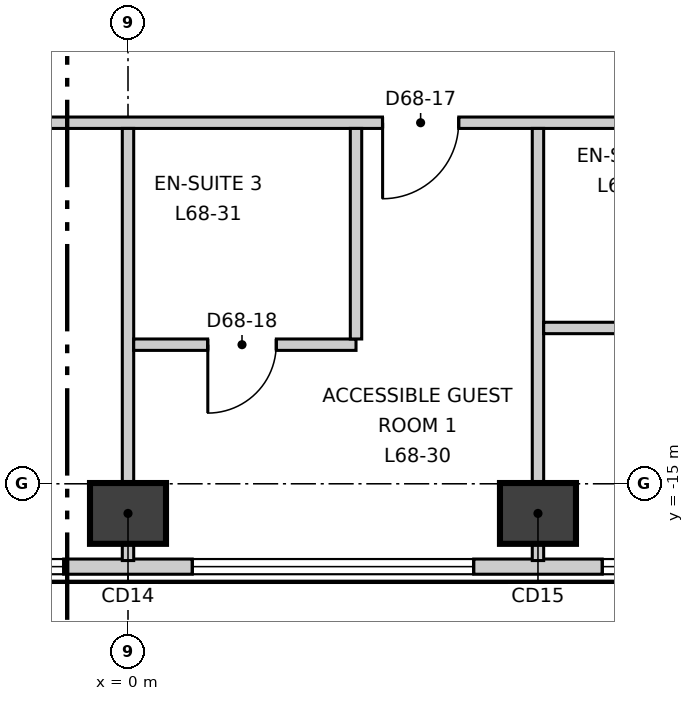
"""IFC4 building model, lengths in metres.
Left out: names, types, materials, properties, quantities, classifications, styles, units other than length and angle.
Written with IfcOpenShell. Run it as: python <this file> out.ifc"""

import sys

from ifc_helpers import new_model, si_unit, direction, frame, frame_2d, origin, origin_2d, place, context, subcontext, project, spatial, rectangle, extrude, element, fill, save


model = new_model("IFC4")
c1 = context("Model", 3, precision=1e-05, world=origin(), true_north=direction((0.0, 1.0)))
c2 = subcontext(c1, "Body", "Model", "MODEL_VIEW")
j1 = project(units=[si_unit("LENGTHUNIT", "METRE"), si_unit("PLANEANGLEUNIT", "RADIAN")], contexts=[c1])
p1 = place(None, origin())
s1 = spatial("IfcSite", under=j1, at=p1, CompositionType="ELEMENT")
p2 = place(p1, origin())
s2 = spatial("IfcBuilding", under=s1, at=p2, CompositionType="ELEMENT")
p3 = place(p2, frame((0.0, 0.0, 289.9)))
s3 = spatial("IfcBuildingStorey", under=s2, at=p3, CompositionType="ELEMENT", Elevation=289.9)
for number, where, z_axis, x_axis in (
    (1, (0.0, -15.39, -0.3), (0.0, 0.0, 1.0), (1.0, 0.0, 0.0)),
    (2, (5.394, -15.39, -0.3), (0.0, 0.0, 1.0), (1.0, 0.0, 0.0)),
):
    element("IfcColumn", number, at=place(p3, frame(where, z_axis=z_axis, x_axis=x_axis)), inside=s3, PredefinedType="COLUMN", context=c2, shape_type="SweptSolid", body=[
        extrude(rectangle(XDim=1.0, YDim=0.8, at=origin_2d()), origin(), (0.0, 0.0, 1.0), 3.6),
    ])
p4 = place(p3, frame((-22.88, -16.09, 0.0), z_axis=(0.0, 0.0, 1.0), x_axis=(1.0, 0.0, 0.0)))
e3 = element("IfcWall", 3, at=p4, inside=s3, PredefinedType="ELEMENTEDWALL", context=c2, shape_type="SweptSolid", body=[
    extrude(rectangle(XDim=45.74, YDim=0.2, at=frame_2d((22.87, 0.0))), origin(), (0.0, 0.0, 1.0), 3.3),
])
p5 = place(p4, frame((2.15, 0.0, 0.9)))
e4 = element("IfcOpeningElement", 4, at=p5, cuts=e3, PredefinedType="OPENING", context=c2, shape_type="SweptSolid", body=[
    extrude(rectangle(XDim=3.7, YDim=2.2, at=frame_2d((1.85, 1.1))), frame((0.0, 0.11, 0.0), z_axis=(0.0, -1.0, 0.0), x_axis=(1.0, 0.0, 0.0)), (0.0, 0.0, 1.0), 0.22),
])
p6 = place(p4, frame((7.544, 0.0, 0.9)))
e5 = element("IfcOpeningElement", 5, at=p6, cuts=e3, PredefinedType="OPENING", context=c2, shape_type="SweptSolid", body=[
    extrude(rectangle(XDim=3.7, YDim=2.2, at=frame_2d((1.85, 1.1))), frame((0.0, 0.11, 0.0), z_axis=(0.0, -1.0, 0.0), x_axis=(1.0, 0.0, 0.0)), (0.0, 0.0, 1.0), 0.22),
])
p7 = place(p4, frame((12.939, 0.0, 0.9)))
e6 = element("IfcOpeningElement", 6, at=p7, cuts=e3, PredefinedType="OPENING", context=c2, shape_type="SweptSolid", body=[
    extrude(rectangle(XDim=3.7, YDim=2.2, at=frame_2d((1.85, 1.1))), frame((0.0, 0.11, 0.0), z_axis=(0.0, -1.0, 0.0), x_axis=(1.0, 0.0, 0.0)), (0.0, 0.0, 1.0), 0.22),
])
p8 = place(p4, frame((18.333, 0.0, 0.9)))
e7 = element("IfcOpeningElement", 7, at=p8, cuts=e3, PredefinedType="OPENING", context=c2, shape_type="SweptSolid", body=[
    extrude(rectangle(XDim=3.7, YDim=2.2, at=frame_2d((1.85, 1.1))), frame((0.0, 0.11, 0.0), z_axis=(0.0, -1.0, 0.0), x_axis=(1.0, 0.0, 0.0)), (0.0, 0.0, 1.0), 0.22),
])
p9 = place(p4, frame((23.727, 0.0, 0.9)))
e8 = element("IfcOpeningElement", 8, at=p9, cuts=e3, PredefinedType="OPENING", context=c2, shape_type="SweptSolid", body=[
    extrude(rectangle(XDim=3.7, YDim=2.2, at=frame_2d((1.85, 1.1))), frame((0.0, 0.11, 0.0), z_axis=(0.0, -1.0, 0.0), x_axis=(1.0, 0.0, 0.0)), (0.0, 0.0, 1.0), 0.22),
])
p10 = place(p4, frame((29.121, 0.0, 0.9)))
e9 = element("IfcOpeningElement", 9, at=p10, cuts=e3, PredefinedType="OPENING", context=c2, shape_type="SweptSolid", body=[
    extrude(rectangle(XDim=3.7, YDim=2.2, at=frame_2d((1.85, 1.1))), frame((0.0, 0.11, 0.0), z_axis=(0.0, -1.0, 0.0), x_axis=(1.0, 0.0, 0.0)), (0.0, 0.0, 1.0), 0.22),
])
p11 = place(p4, frame((34.516, 0.0, 0.9)))
e10 = element("IfcOpeningElement", 10, at=p11, cuts=e3, PredefinedType="OPENING", context=c2, shape_type="SweptSolid", body=[
    extrude(rectangle(XDim=3.7, YDim=2.2, at=frame_2d((1.85, 1.1))), frame((0.0, 0.11, 0.0), z_axis=(0.0, -1.0, 0.0), x_axis=(1.0, 0.0, 0.0)), (0.0, 0.0, 1.0), 0.22),
])
p12 = place(p4, frame((39.91, 0.0, 0.9)))
e11 = element("IfcOpeningElement", 11, at=p12, cuts=e3, PredefinedType="OPENING", context=c2, shape_type="SweptSolid", body=[
    extrude(rectangle(XDim=3.7, YDim=2.2, at=frame_2d((1.85, 1.1))), frame((0.0, 0.11, 0.0), z_axis=(0.0, -1.0, 0.0), x_axis=(1.0, 0.0, 0.0)), (0.0, 0.0, 1.0), 0.22),
])
p13 = place(p3, frame((25.375, -11.77, 0.0), z_axis=(0.0, 0.0, 1.0), x_axis=(-0.500008134474, 0.866020707292, 0.0)))
e12 = element("IfcWall", 12, at=p13, inside=s3, PredefinedType="ELEMENTEDWALL", context=c2, shape_type="SweptSolid", body=[
    extrude(rectangle(XDim=45.741, YDim=0.2, at=frame_2d((22.871, 0.0))), origin(), (0.0, 0.0, 1.0), 3.3),
])
p14 = place(p13, frame((2.15, 0.0, 0.9)))
e13 = element("IfcOpeningElement", 13, at=p14, cuts=e12, PredefinedType="OPENING", context=c2, shape_type="SweptSolid", body=[
    extrude(rectangle(XDim=3.7, YDim=2.2, at=frame_2d((1.85, 1.1))), frame((0.0, 0.11, 0.0), z_axis=(0.0, -1.0, 0.0), x_axis=(1.0, 0.0, 0.0)), (0.0, 0.0, 1.0), 0.22),
])
p15 = place(p13, frame((7.544, 0.0, 0.9)))
e14 = element("IfcOpeningElement", 14, at=p15, cuts=e12, PredefinedType="OPENING", context=c2, shape_type="SweptSolid", body=[
    extrude(rectangle(XDim=3.7, YDim=2.2, at=frame_2d((1.85, 1.1))), frame((0.0, 0.11, 0.0), z_axis=(0.0, -1.0, 0.0), x_axis=(1.0, 0.0, 0.0)), (0.0, 0.0, 1.0), 0.22),
])
p16 = place(p13, frame((12.939, 0.0, 0.9)))
e15 = element("IfcOpeningElement", 15, at=p16, cuts=e12, PredefinedType="OPENING", context=c2, shape_type="SweptSolid", body=[
    extrude(rectangle(XDim=3.7, YDim=2.2, at=frame_2d((1.85, 1.1))), frame((0.0, 0.11, 0.0), z_axis=(0.0, -1.0, 0.0), x_axis=(1.0, 0.0, 0.0)), (0.0, 0.0, 1.0), 0.22),
])
p17 = place(p13, frame((18.333, 0.0, 0.9)))
e16 = element("IfcOpeningElement", 16, at=p17, cuts=e12, PredefinedType="OPENING", context=c2, shape_type="SweptSolid", body=[
    extrude(rectangle(XDim=3.7, YDim=2.2, at=frame_2d((1.85, 1.1))), frame((0.0, 0.11, 0.0), z_axis=(0.0, -1.0, 0.0), x_axis=(1.0, 0.0, 0.0)), (0.0, 0.0, 1.0), 0.22),
])
p18 = place(p13, frame((23.728, 0.0, 0.9)))
e17 = element("IfcOpeningElement", 17, at=p18, cuts=e12, PredefinedType="OPENING", context=c2, shape_type="SweptSolid", body=[
    extrude(rectangle(XDim=3.7, YDim=2.2, at=frame_2d((1.85, 1.1))), frame((0.0, 0.11, 0.0), z_axis=(0.0, -1.0, 0.0), x_axis=(1.0, 0.0, 0.0)), (0.0, 0.0, 1.0), 0.22),
])
p19 = place(p13, frame((29.122, 0.0, 0.9)))
e18 = element("IfcOpeningElement", 18, at=p19, cuts=e12, PredefinedType="OPENING", context=c2, shape_type="SweptSolid", body=[
    extrude(rectangle(XDim=3.7, YDim=2.2, at=frame_2d((1.85, 1.1))), frame((0.0, 0.11, 0.0), z_axis=(0.0, -1.0, 0.0), x_axis=(1.0, 0.0, 0.0)), (0.0, 0.0, 1.0), 0.22),
])
p20 = place(p13, frame((34.517, 0.0, 0.9)))
e19 = element("IfcOpeningElement", 19, at=p20, cuts=e12, PredefinedType="OPENING", context=c2, shape_type="SweptSolid", body=[
    extrude(rectangle(XDim=3.7, YDim=2.2, at=frame_2d((1.85, 1.1))), frame((0.0, 0.11, 0.0), z_axis=(0.0, -1.0, 0.0), x_axis=(1.0, 0.0, 0.0)), (0.0, 0.0, 1.0), 0.22),
])
p21 = place(p13, frame((39.911, 0.0, 0.9)))
e20 = element("IfcOpeningElement", 20, at=p21, cuts=e12, PredefinedType="OPENING", context=c2, shape_type="SweptSolid", body=[
    extrude(rectangle(XDim=3.7, YDim=2.2, at=frame_2d((1.85, 1.1))), frame((0.0, 0.11, 0.0), z_axis=(0.0, -1.0, 0.0), x_axis=(1.0, 0.0, 0.0)), (0.0, 0.0, 1.0), 0.22),
])
p22 = place(p3, frame((-17.603, -10.25, 0.0), z_axis=(0.0, 0.0, 1.0), x_axis=(1.0, 0.0, 0.0)))
e21 = element("IfcWall", 21, at=p22, inside=s3, PredefinedType="PARTITIONING", context=c2, shape_type="SweptSolid", body=[
    extrude(rectangle(XDim=35.356, YDim=0.15, at=frame_2d((17.678, 0.0))), origin(), (0.0, 0.0, 1.0), 3.3),
])
p23 = place(p22, frame((2.8, 0.0, 0.0)))
e22 = element("IfcOpeningElement", 22, at=p23, cuts=e21, PredefinedType="OPENING", context=c2, shape_type="SweptSolid", body=[
    extrude(rectangle(XDim=1.0, YDim=2.1, at=frame_2d((0.5, 1.05))), frame((0.0, 0.085, 0.0), z_axis=(0.0, -1.0, 0.0), x_axis=(1.0, 0.0, 0.0)), (0.0, 0.0, 1.0), 0.17),
])
p24 = place(p22, frame((15.065, 0.0, 0.0)))
e23 = element("IfcOpeningElement", 23, at=p24, cuts=e21, PredefinedType="OPENING", context=c2, shape_type="SweptSolid", body=[
    extrude(rectangle(XDim=1.0, YDim=2.1, at=frame_2d((0.5, 1.05))), frame((0.0, 0.085, 0.0), z_axis=(0.0, -1.0, 0.0), x_axis=(1.0, 0.0, 0.0)), (0.0, 0.0, 1.0), 0.17),
])
p25 = place(p22, frame((9.765, 0.0, 0.0)))
e24 = element("IfcOpeningElement", 24, at=p25, cuts=e21, PredefinedType="OPENING", context=c2, shape_type="SweptSolid", body=[
    extrude(rectangle(XDim=0.9, YDim=2.1, at=frame_2d((0.45, 1.05))), frame((0.0, 0.085, 0.0), z_axis=(0.0, -1.0, 0.0), x_axis=(1.0, 0.0, 0.0)), (0.0, 0.0, 1.0), 0.17),
])
p26 = place(p22, frame((11.965, 0.0, 0.0)))
e25 = element("IfcOpeningElement", 25, at=p26, cuts=e21, PredefinedType="OPENING", context=c2, shape_type="SweptSolid", body=[
    extrude(rectangle(XDim=0.9, YDim=2.1, at=frame_2d((0.45, 1.05))), frame((0.0, 0.085, 0.0), z_axis=(0.0, -1.0, 0.0), x_axis=(1.0, 0.0, 0.0)), (0.0, 0.0, 1.0), 0.17),
])
p27 = place(p22, frame((20.953, 0.0, 0.0)))
e26 = element("IfcOpeningElement", 26, at=p27, cuts=e21, PredefinedType="OPENING", context=c2, shape_type="SweptSolid", body=[
    extrude(rectangle(XDim=1.0, YDim=2.1, at=frame_2d((0.5, 1.05))), frame((0.0, 0.085, 0.0), z_axis=(0.0, -1.0, 0.0), x_axis=(1.0, 0.0, 0.0)), (0.0, 0.0, 1.0), 0.17),
])
p28 = place(p22, frame((26.347, 0.0, 0.0)))
e27 = element("IfcOpeningElement", 27, at=p28, cuts=e21, PredefinedType="OPENING", context=c2, shape_type="SweptSolid", body=[
    extrude(rectangle(XDim=1.0, YDim=2.1, at=frame_2d((0.5, 1.05))), frame((0.0, 0.085, 0.0), z_axis=(0.0, -1.0, 0.0), x_axis=(1.0, 0.0, 0.0)), (0.0, 0.0, 1.0), 0.17),
])
p29 = place(p22, frame((31.342, 0.0, 0.0)))
e28 = element("IfcOpeningElement", 28, at=p29, cuts=e21, PredefinedType="OPENING", context=c2, shape_type="SweptSolid", body=[
    extrude(rectangle(XDim=1.0, YDim=2.1, at=frame_2d((0.5, 1.05))), frame((0.0, 0.085, 0.0), z_axis=(0.0, -1.0, 0.0), x_axis=(1.0, 0.0, 0.0)), (0.0, 0.0, 1.0), 0.17),
])
p30 = place(p3, frame((-17.679, -10.12, 0.0), z_axis=(0.0, 0.0, 1.0), x_axis=(0.500008955215, 0.866020233427, 0.0)))
e29 = element("IfcWall", 29, at=p30, inside=s3, PredefinedType="PARTITIONING", context=c2, shape_type="SweptSolid", body=[
    extrude(rectangle(XDim=35.357, YDim=0.15, at=frame_2d((17.679, 0.0))), origin(), (0.0, 0.0, 1.0), 3.3),
])
p31 = place(p30, frame((31.407, 0.0, 0.0)))
e30 = element("IfcOpeningElement", 30, at=p31, cuts=e29, PredefinedType="OPENING", context=c2, shape_type="SweptSolid", body=[
    extrude(rectangle(XDim=1.0, YDim=2.1, at=frame_2d((0.5, 1.05))), frame((0.0, 0.085, 0.0), z_axis=(0.0, -1.0, 0.0), x_axis=(1.0, 0.0, 0.0)), (0.0, 0.0, 1.0), 0.17),
])
p32 = place(p30, frame((25.642, 0.0, 0.0)))
e31 = element("IfcOpeningElement", 31, at=p32, cuts=e29, PredefinedType="OPENING", context=c2, shape_type="SweptSolid", body=[
    extrude(rectangle(XDim=1.0, YDim=2.1, at=frame_2d((0.5, 1.05))), frame((0.0, 0.085, 0.0), z_axis=(0.0, -1.0, 0.0), x_axis=(1.0, 0.0, 0.0)), (0.0, 0.0, 1.0), 0.17),
])
p33 = place(p30, frame((18.348, 0.0, 0.0)))
e32 = element("IfcOpeningElement", 32, at=p33, cuts=e29, PredefinedType="OPENING", context=c2, shape_type="SweptSolid", body=[
    extrude(rectangle(XDim=1.0, YDim=2.1, at=frame_2d((0.5, 1.05))), frame((0.0, 0.085, 0.0), z_axis=(0.0, -1.0, 0.0), x_axis=(1.0, 0.0, 0.0)), (0.0, 0.0, 1.0), 0.17),
])
p34 = place(p30, frame((13.254, 0.0, 0.0)))
e33 = element("IfcOpeningElement", 33, at=p34, cuts=e29, PredefinedType="OPENING", context=c2, shape_type="SweptSolid", body=[
    extrude(rectangle(XDim=1.0, YDim=2.1, at=frame_2d((0.5, 1.05))), frame((0.0, 0.085, 0.0), z_axis=(0.0, -1.0, 0.0), x_axis=(1.0, 0.0, 0.0)), (0.0, 0.0, 1.0), 0.17),
])
p35 = place(p30, frame((7.559, 0.0, 0.0)))
e34 = element("IfcOpeningElement", 34, at=p35, cuts=e29, PredefinedType="OPENING", context=c2, shape_type="SweptSolid", body=[
    extrude(rectangle(XDim=1.0, YDim=2.1, at=frame_2d((0.5, 1.05))), frame((0.0, 0.085, 0.0), z_axis=(0.0, -1.0, 0.0), x_axis=(1.0, 0.0, 0.0)), (0.0, 0.0, 1.0), 0.17),
])
p36 = place(p30, frame((2.865, 0.0, 0.0)))
e35 = element("IfcOpeningElement", 35, at=p36, cuts=e29, PredefinedType="OPENING", context=c2, shape_type="SweptSolid", body=[
    extrude(rectangle(XDim=1.0, YDim=2.1, at=frame_2d((0.5, 1.05))), frame((0.0, 0.085, 0.0), z_axis=(0.0, -1.0, 0.0), x_axis=(1.0, 0.0, 0.0)), (0.0, 0.0, 1.0), 0.17),
])
p37 = place(p3, frame((0.0, -16.01, 0.0), z_axis=(0.0, 0.0, 1.0), x_axis=(0.0, 1.0, 0.0)))
e36 = element("IfcWall", 36, at=p37, inside=s3, PredefinedType="PARTITIONING", context=c2, shape_type="SweptSolid", body=[
    extrude(rectangle(XDim=5.685, YDim=0.15, at=frame_2d((2.843, 0.0))), origin(), (0.0, 0.0, 1.0), 2.8),
])
p38 = place(p3, frame((0.075, 20.37, 0.0), z_axis=(0.0, 0.0, 1.0), x_axis=(0.500009775255, -0.866019759965, 0.0)))
e37 = element("IfcWall", 37, at=p38, inside=s3, PredefinedType="PARTITIONING", context=c2, shape_type="SweptSolid", body=[
    extrude(rectangle(XDim=35.207, YDim=0.15, at=frame_2d((17.604, 0.0))), origin(), (0.0, 0.0, 1.0), 3.3),
])
p39 = place(p38, frame((31.407, 0.0, 0.0)))
e38 = element("IfcOpeningElement", 38, at=p39, cuts=e37, PredefinedType="OPENING", context=c2, shape_type="SweptSolid", body=[
    extrude(rectangle(XDim=1.0, YDim=2.1, at=frame_2d((0.5, 1.05))), frame((0.0, 0.085, 0.0), z_axis=(0.0, -1.0, 0.0), x_axis=(1.0, 0.0, 0.0)), (0.0, 0.0, 1.0), 0.17),
])
p40 = place(p38, frame((19.243, 0.0, 0.0)))
e39 = element("IfcOpeningElement", 39, at=p40, cuts=e37, PredefinedType="OPENING", context=c2, shape_type="SweptSolid", body=[
    extrude(rectangle(XDim=1.0, YDim=2.1, at=frame_2d((0.5, 1.05))), frame((0.0, 0.085, 0.0), z_axis=(0.0, -1.0, 0.0), x_axis=(1.0, 0.0, 0.0)), (0.0, 0.0, 1.0), 0.17),
])
p41 = place(p38, frame((24.543, 0.0, 0.0)))
e40 = element("IfcOpeningElement", 40, at=p41, cuts=e37, PredefinedType="OPENING", context=c2, shape_type="SweptSolid", body=[
    extrude(rectangle(XDim=0.9, YDim=2.1, at=frame_2d((0.45, 1.05))), frame((0.0, 0.085, 0.0), z_axis=(0.0, -1.0, 0.0), x_axis=(1.0, 0.0, 0.0)), (0.0, 0.0, 1.0), 0.17),
])
p42 = place(p38, frame((22.443, 0.0, 0.0)))
e41 = element("IfcOpeningElement", 41, at=p42, cuts=e37, PredefinedType="OPENING", context=c2, shape_type="SweptSolid", body=[
    extrude(rectangle(XDim=0.9, YDim=2.1, at=frame_2d((0.45, 1.05))), frame((0.0, 0.085, 0.0), z_axis=(0.0, -1.0, 0.0), x_axis=(1.0, 0.0, 0.0)), (0.0, 0.0, 1.0), 0.17),
])
p43 = place(p38, frame((13.253, 0.0, 0.0)))
e42 = element("IfcOpeningElement", 42, at=p43, cuts=e37, PredefinedType="OPENING", context=c2, shape_type="SweptSolid", body=[
    extrude(rectangle(XDim=1.0, YDim=2.1, at=frame_2d((0.5, 1.05))), frame((0.0, 0.085, 0.0), z_axis=(0.0, -1.0, 0.0), x_axis=(1.0, 0.0, 0.0)), (0.0, 0.0, 1.0), 0.17),
])
p44 = place(p38, frame((5.559, 0.0, 0.0)))
e43 = element("IfcOpeningElement", 43, at=p44, cuts=e37, PredefinedType="OPENING", context=c2, shape_type="SweptSolid", body=[
    extrude(rectangle(XDim=1.0, YDim=2.1, at=frame_2d((0.5, 1.05))), frame((0.0, 0.085, 0.0), z_axis=(0.0, -1.0, 0.0), x_axis=(1.0, 0.0, 0.0)), (0.0, 0.0, 1.0), 0.17),
])
p45 = place(p3, frame((5.394, -16.01, 0.0), z_axis=(0.0, 0.0, 1.0), x_axis=(0.0, 1.0, 0.0)))
e44 = element("IfcWall", 44, at=p45, inside=s3, PredefinedType="PARTITIONING", context=c2, shape_type="SweptSolid", body=[
    extrude(rectangle(XDim=5.685, YDim=0.15, at=frame_2d((2.843, 0.0))), origin(), (0.0, 0.0, 1.0), 3.3),
])
p46 = place(p3, frame((5.469, -12.95, 0.0), z_axis=(0.0, 0.0, 1.0), x_axis=(1.0, 0.0, 0.0)))
e45 = element("IfcWall", 45, at=p46, inside=s3, PredefinedType="PARTITIONING", context=c2, shape_type="SweptSolid", body=[
    extrude(rectangle(XDim=2.225, YDim=0.15, at=frame_2d((1.113, 0.0))), origin(), (0.0, 0.0, 1.0), 3.3),
])
p47 = place(p3, frame((0.075, -13.17, 0.0), z_axis=(0.0, 0.0, 1.0), x_axis=(1.0, 0.0, 0.0)))
e46 = element("IfcWall", 46, at=p47, inside=s3, PredefinedType="PARTITIONING", context=c2, shape_type="SweptSolid", body=[
    extrude(rectangle(XDim=2.925, YDim=0.15, at=frame_2d((1.462, 0.0))), origin(), (0.0, 0.0, 1.0), 3.3),
])
p48 = place(p47, frame((0.975, 0.0, 0.0)))
e47 = element("IfcOpeningElement", 47, at=p48, cuts=e46, PredefinedType="OPENING", context=c2, shape_type="SweptSolid", body=[
    extrude(rectangle(XDim=0.9, YDim=2.1, at=frame_2d((0.45, 1.05))), frame((0.0, 0.085, 0.0), z_axis=(0.0, -1.0, 0.0), x_axis=(1.0, 0.0, 0.0)), (0.0, 0.0, 1.0), 0.17),
])
p49 = place(p3, frame((3.0, -13.095, 0.0), z_axis=(0.0, 0.0, 1.0), x_axis=(0.0, 1.0, 0.0)))
e48 = element("IfcWall", 48, at=p49, inside=s3, PredefinedType="PARTITIONING", context=c2, shape_type="SweptSolid", body=[
    extrude(rectangle(XDim=2.77, YDim=0.15, at=frame_2d((1.385, 0.0))), origin(), (0.0, 0.0, 1.0), 3.3),
])
p50 = place(p8, origin())
e49 = element("IfcWindow", 49, at=p50, inside=s3, PartitioningType="SINGLE_PANEL", PredefinedType="WINDOW", context=c2, shape_type="SweptSolid", body=[
    extrude(rectangle(XDim=3.7, YDim=2.2, at=frame_2d((1.85, 1.1))), frame((0.0, 0.03, 0.0), z_axis=(0.0, -1.0, 0.0), x_axis=(1.0, 0.0, 0.0)), (0.0, 0.0, 1.0), 0.06),
])
fill(e7, e49)
p51 = place(p9, origin())
e50 = element("IfcWindow", 50, at=p51, inside=s3, PartitioningType="SINGLE_PANEL", PredefinedType="WINDOW", context=c2, shape_type="SweptSolid", body=[
    extrude(rectangle(XDim=3.7, YDim=2.2, at=frame_2d((1.85, 1.1))), frame((0.0, 0.03, 0.0), z_axis=(0.0, -1.0, 0.0), x_axis=(1.0, 0.0, 0.0)), (0.0, 0.0, 1.0), 0.06),
])
fill(e8, e50)
p52 = place(p10, origin())
e51 = element("IfcWindow", 51, at=p52, inside=s3, PartitioningType="SINGLE_PANEL", PredefinedType="WINDOW", context=c2, shape_type="SweptSolid", body=[
    extrude(rectangle(XDim=3.7, YDim=2.2, at=frame_2d((1.85, 1.1))), frame((0.0, 0.03, 0.0), z_axis=(0.0, -1.0, 0.0), x_axis=(1.0, 0.0, 0.0)), (0.0, 0.0, 1.0), 0.06),
])
fill(e9, e51)
p53 = place(p27, origin())
e52 = element("IfcDoor", 52, at=p53, inside=s3, OperationType="SINGLE_SWING_LEFT", PredefinedType="DOOR", context=c2, shape_type="SweptSolid", body=[
    extrude(rectangle(XDim=1.0, YDim=2.1, at=frame_2d((0.5, 1.05))), frame((0.0, 0.025, 0.0), z_axis=(0.0, -1.0, 0.0), x_axis=(1.0, 0.0, 0.0)), (0.0, 0.0, 1.0), 0.05),
])
fill(e26, e52)
p54 = place(p48, origin())
e53 = element("IfcDoor", 53, at=p54, inside=s3, OperationType="SINGLE_SWING_LEFT", PredefinedType="DOOR", context=c2, shape_type="SweptSolid", body=[
    extrude(rectangle(XDim=0.9, YDim=2.1, at=frame_2d((0.45, 1.05))), frame((0.0, 0.025, 0.0), z_axis=(0.0, -1.0, 0.0), x_axis=(1.0, 0.0, 0.0)), (0.0, 0.0, 1.0), 0.05),
])
fill(e47, e53)
save(model, sys.argv[1])
